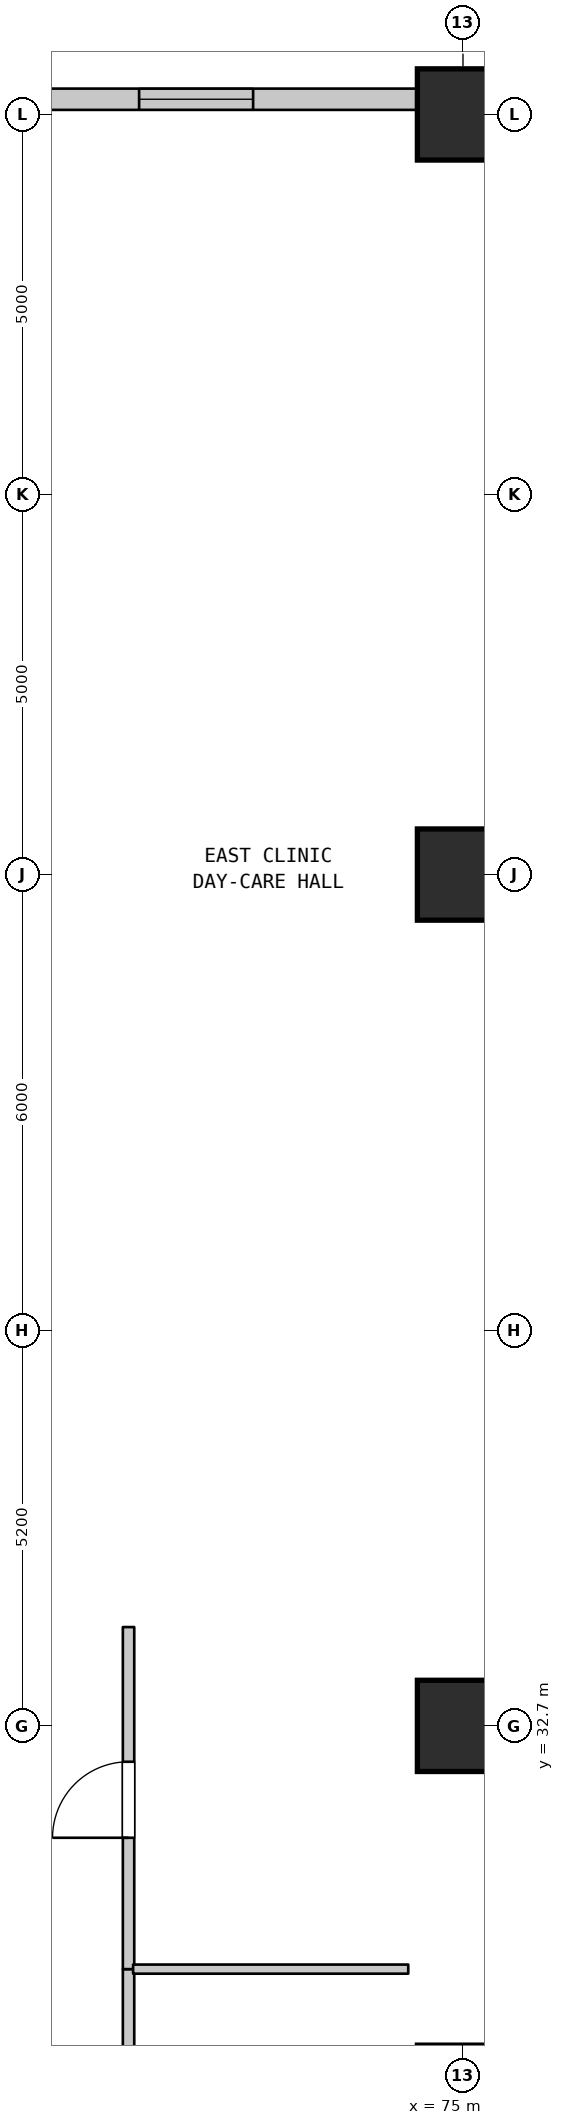
"""IFC4 building model, lengths in metres.
Left out: names, types, materials, properties, quantities, classifications, styles, units other than length and angle.
Written with IfcOpenShell. Run it as: python <this file> out.ifc"""

import sys

from ifc_helpers import new_model, si_unit, direction, frame, frame_2d, origin, origin_2d, place, context, subcontext, project, spatial, rectangle, extrude, element, fill, save


model = new_model("IFC4")
c1 = context("Model", 3, precision=1e-05, world=origin(), true_north=direction((0.0, 1.0)))
c2 = subcontext(c1, "Body", "Model", "MODEL_VIEW")
j1 = project(units=[si_unit("LENGTHUNIT", "METRE"), si_unit("PLANEANGLEUNIT", "RADIAN")], contexts=[c1])
p1 = place(None, origin())
s1 = spatial("IfcSite", under=j1, at=p1, CompositionType="ELEMENT")
p2 = place(p1, origin())
s2 = spatial("IfcBuilding", under=s1, at=p2, CompositionType="ELEMENT")
p3 = place(p2, frame((0.0, 0.0, 13.0)))
s3 = spatial("IfcBuildingStorey", under=s2, at=p3, CompositionType="ELEMENT", Elevation=13.0)
for number, where, z_axis, x_axis in (
    (1, (75.0, 32.7, 0.0), (0.0, 0.0, 1.0), (1.0, 0.0, 0.0)),
    (2, (75.0, 43.9, 0.0), (0.0, 0.0, 1.0), (1.0, 0.0, 0.0)),
    (3, (75.0, 53.9, 0.0), (0.0, 0.0, 1.0), (1.0, 0.0, 0.0)),
):
    element("IfcColumn", number, at=place(p3, frame(where, z_axis=z_axis, x_axis=x_axis)), inside=s3, PredefinedType="PILASTER", context=c2, shape_type="SweptSolid", body=[
        extrude(rectangle(XDim=1.2, YDim=1.2, at=origin_2d()), origin(), (0.0, 0.0, 1.0), 6.0),
    ])
p4 = place(p3, frame((74.586, 54.1, 0.0), z_axis=(0.0, 0.0, 1.0), x_axis=(0.923717339373, -0.383074766777, 0.0)))
e4 = element("IfcWall", 4, at=p4, inside=s3, PredefinedType="STANDARD", context=c2, shape_type="SweptSolid", body=[
    extrude(rectangle(XDim=0.765, YDim=0.28, at=frame_2d((0.383, 0.0))), origin(), (0.0, 0.0, 1.0), 5.58),
])
p5 = place(p3, frame((75.293, 53.807, 0.0), z_axis=(0.0, 0.0, 1.0), x_axis=(0.707167825498, -0.707045731605, 0.0)))
e5 = element("IfcWall", 5, at=p5, inside=s3, PredefinedType="STANDARD", context=c2, shape_type="SweptSolid", body=[
    extrude(rectangle(XDim=2.0, YDim=0.28, at=frame_2d((1.0, 0.0))), origin(), (0.0, 0.0, 1.0), 5.58),
])
p6 = place(p3, frame((63.0, 54.1, 0.0), z_axis=(0.0, 0.0, 1.0), x_axis=(1.0, 0.0, 0.0)))
e6 = element("IfcWall", 6, at=p6, inside=s3, PredefinedType="STANDARD", context=c2, shape_type="SweptSolid", body=[
    extrude(rectangle(XDim=11.586, YDim=0.28, at=frame_2d((5.793, 0.0))), origin(), (0.0, 0.0, 1.0), 4.38),
])
p7 = place(p6, frame((2.346, 0.0, 0.95)))
e7 = element("IfcOpeningElement", 7, at=p7, cuts=e6, PredefinedType="OPENING", context=c2, shape_type="SweptSolid", body=[
    extrude(rectangle(XDim=1.5, YDim=1.8, at=frame_2d((0.75, 0.9))), frame((0.0, 0.15, 0.0), z_axis=(0.0, -1.0, 0.0), x_axis=(1.0, 0.0, 0.0)), (0.0, 0.0, 1.0), 0.3),
])
p8 = place(p6, frame((7.739, 0.0, 0.95)))
e8 = element("IfcOpeningElement", 8, at=p8, cuts=e6, PredefinedType="OPENING", context=c2, shape_type="SweptSolid", body=[
    extrude(rectangle(XDim=1.5, YDim=1.8, at=frame_2d((0.75, 0.9))), frame((0.0, 0.15, 0.0), z_axis=(0.0, -1.0, 0.0), x_axis=(1.0, 0.0, 0.0)), (0.0, 0.0, 1.0), 0.3),
])
p9 = place(p3, frame((70.6, 20.0, 0.0), z_axis=(0.0, 0.0, 1.0), x_axis=(0.0, 1.0, 0.0)))
e9 = element("IfcWall", 9, at=p9, inside=s3, PredefinedType="STANDARD", context=c2, shape_type="SweptSolid", body=[
    extrude(rectangle(XDim=9.5, YDim=0.15, at=frame_2d((4.75, 0.0))), origin(), (0.0, 0.0, 1.0), 5.58),
])
p10 = place(p9, frame((4.229, 0.0, 0.0)))
e10 = element("IfcOpeningElement", 10, at=p10, cuts=e9, PredefinedType="OPENING", context=c2, shape_type="SweptSolid", body=[
    extrude(rectangle(XDim=1.0, YDim=2.15, at=frame_2d((0.5, 1.075))), frame((0.0, 0.085, 0.0), z_axis=(0.0, -1.0, 0.0), x_axis=(1.0, 0.0, 0.0)), (0.0, 0.0, 1.0), 0.17),
])
p11 = place(p3, frame((70.6, 29.5, 0.0), z_axis=(0.0, 0.0, 1.0), x_axis=(0.0, 1.0, 0.0)))
e11 = element("IfcWall", 11, at=p11, inside=s3, PredefinedType="STANDARD", context=c2, shape_type="SweptSolid", body=[
    extrude(rectangle(XDim=4.5, YDim=0.15, at=frame_2d((2.25, 0.0))), origin(), (0.0, 0.0, 1.0), 5.58),
])
p12 = place(p11, frame((1.728, 0.0, 0.0)))
e12 = element("IfcOpeningElement", 12, at=p12, cuts=e11, PredefinedType="OPENING", context=c2, shape_type="SweptSolid", body=[
    extrude(rectangle(XDim=1.0, YDim=2.15, at=frame_2d((0.5, 1.075))), frame((0.0, 0.085, 0.0), z_axis=(0.0, -1.0, 0.0), x_axis=(1.0, 0.0, 0.0)), (0.0, 0.0, 1.0), 0.17),
])
p13 = place(p3, frame((70.66, 29.5, 0.0), z_axis=(0.0, 0.0, 1.0), x_axis=(1.0, 0.0, 0.0)))
e13 = element("IfcWall", 13, at=p13, inside=s3, PredefinedType="PARTITIONING", context=c2, shape_type="SweptSolid", body=[
    extrude(rectangle(XDim=3.62, YDim=0.12, at=frame_2d((1.81, 0.0))), origin(), (0.0, 0.0, 1.0), 5.58),
])
p14 = place(p8, origin())
e14 = element("IfcWindow", 14, at=p14, inside=s3, PartitioningType="SINGLE_PANEL", PredefinedType="WINDOW", context=c2, shape_type="SweptSolid", body=[
    extrude(rectangle(XDim=1.5, YDim=1.8, at=frame_2d((0.75, 0.9))), frame((0.0, 0.03, 0.0), z_axis=(0.0, -1.0, 0.0), x_axis=(1.0, 0.0, 0.0)), (0.0, 0.0, 1.0), 0.06),
])
fill(e8, e14)
p15 = place(p12, origin())
e15 = element("IfcDoor", 15, at=p15, inside=s3, OperationType="SINGLE_SWING_LEFT", PredefinedType="DOOR", context=c2, shape_type="SweptSolid", body=[
    extrude(rectangle(XDim=1.0, YDim=2.15, at=frame_2d((0.5, 1.075))), frame((0.0, 0.025, 0.0), z_axis=(0.0, -1.0, 0.0), x_axis=(1.0, 0.0, 0.0)), (0.0, 0.0, 1.0), 0.05),
])
fill(e12, e15)
save(model, sys.argv[1])
